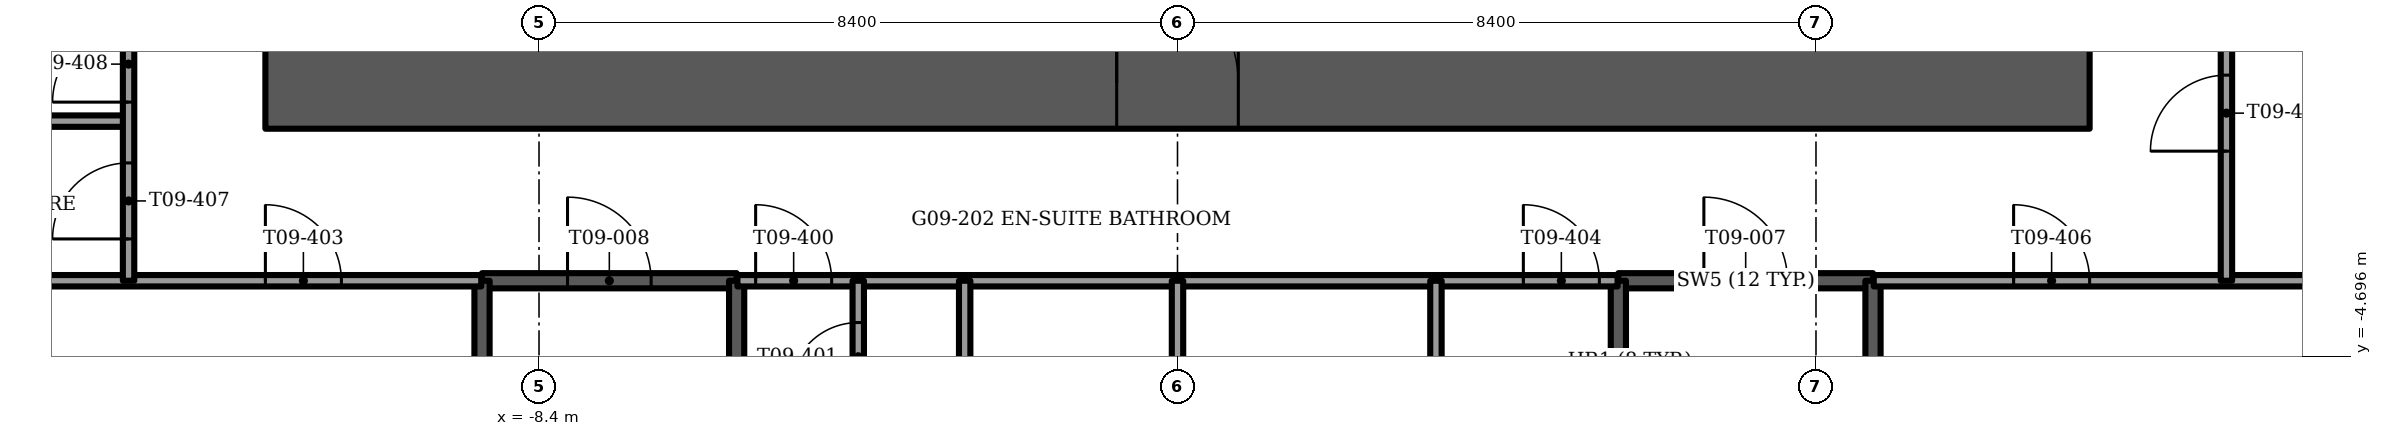
"""IFC4 building model, lengths in metres.
Left out: names, types, materials, properties, quantities, classifications, styles, units other than length and angle.
Written with IfcOpenShell. Run it as: python <this file> out.ifc"""

import sys

from ifc_helpers import new_model, si_unit, direction, frame, frame_2d, origin, place, context, subcontext, project, spatial, rectangle, extrude, element, fill, save


model = new_model("IFC4")
c1 = context("Model", 3, precision=1e-05, world=origin(), true_north=direction((0.0, 1.0)))
c2 = subcontext(c1, "Body", "Model", "MODEL_VIEW")
j1 = project(units=[si_unit("LENGTHUNIT", "METRE"), si_unit("PLANEANGLEUNIT", "RADIAN")], contexts=[c1])
p1 = place(None, origin())
s1 = spatial("IfcSite", under=j1, at=p1, CompositionType="ELEMENT")
p2 = place(p1, origin())
s2 = spatial("IfcBuilding", under=s1, at=p2, CompositionType="ELEMENT")
p3 = place(p2, frame((0.0, 0.0, 39.25)))
s3 = spatial("IfcBuildingStorey", under=s2, at=p3, CompositionType="ELEMENT", Elevation=39.25)
p4 = place(p3, frame((-12.0, -1.1, -0.3), z_axis=(0.0, 0.0, 1.0), x_axis=(1.0, 0.0, 0.0)))
e1 = element("IfcWall", 1, at=p4, inside=s3, PredefinedType="SHEAR", context=c2, shape_type="SweptSolid", body=[
    extrude(rectangle(XDim=24.0, YDim=1.2, at=frame_2d((12.0, 0.0))), origin(), (0.0, 0.0, 1.0), 3.75),
])
p5 = place(p4, frame((11.2, 0.0, 0.0)))
e2 = element("IfcOpeningElement", 2, at=p5, cuts=e1, PredefinedType="OPENING", context=c2, shape_type="SweptSolid", body=[
    extrude(rectangle(XDim=1.6, YDim=2.1, at=frame_2d((0.8, 1.05))), frame((0.0, 0.6, 0.0), z_axis=(0.0, -1.0, 0.0), x_axis=(1.0, 0.0, 0.0)), (0.0, 0.0, 1.0), 1.2),
])
p6 = place(p3, frame((-20.826, -0.778, 0.0), z_axis=(0.0, 0.0, 1.0), x_axis=(0.499999841607, -0.866025495233, 0.0)))
e3 = element("IfcWall", 3, at=p6, inside=s3, PredefinedType="SOLIDWALL", context=c2, shape_type="SweptSolid", body=[
    extrude(rectangle(XDim=19.479, YDim=0.15, at=frame_2d((9.739, 0.0))), origin(), (0.0, 0.0, 1.0), 3.45),
])
p7 = place(p6, frame((1.639, 0.0, 0.15)))
e4 = element("IfcOpeningElement", 4, at=p7, cuts=e3, PredefinedType="OPENING", context=c2, shape_type="SweptSolid", body=[
    extrude(rectangle(XDim=0.9, YDim=2.85, at=frame_2d((0.45, 1.425))), frame((0.0, 0.075, 0.0), z_axis=(0.0, -1.0, 0.0), x_axis=(1.0, 0.0, 0.0)), (0.0, 0.0, 1.0), 0.15),
])
p8 = place(p6, frame((5.839, 0.0, 0.15)))
e5 = element("IfcOpeningElement", 5, at=p8, cuts=e3, PredefinedType="OPENING", context=c2, shape_type="SweptSolid", body=[
    extrude(rectangle(XDim=1.8, YDim=2.85, at=frame_2d((0.9, 1.425))), frame((0.0, 0.075, 0.0), z_axis=(0.0, -1.0, 0.0), x_axis=(1.0, 0.0, 0.0)), (0.0, 0.0, 1.0), 0.15),
])
p9 = place(p6, frame((7.939, 0.0, 0.0)))
e6 = element("IfcOpeningElement", 6, at=p9, cuts=e3, PredefinedType="OPENING", context=c2, shape_type="SweptSolid", body=[
    extrude(rectangle(XDim=1.5, YDim=2.4, at=frame_2d((0.75, 1.2))), frame((0.0, 0.075, 0.0), z_axis=(0.0, -1.0, 0.0), x_axis=(1.0, 0.0, 0.0)), (0.0, 0.0, 1.0), 0.15),
])
p10 = place(p6, frame((10.039, 0.0, 0.15)))
e7 = element("IfcOpeningElement", 7, at=p10, cuts=e3, PredefinedType="OPENING", context=c2, shape_type="SweptSolid", body=[
    extrude(rectangle(XDim=1.8, YDim=2.85, at=frame_2d((0.9, 1.425))), frame((0.0, 0.075, 0.0), z_axis=(0.0, -1.0, 0.0), x_axis=(1.0, 0.0, 0.0)), (0.0, 0.0, 1.0), 0.15),
])
p11 = place(p6, frame((12.139, 0.0, 0.0)))
e8 = element("IfcOpeningElement", 8, at=p11, cuts=e3, PredefinedType="OPENING", context=c2, shape_type="SweptSolid", body=[
    extrude(rectangle(XDim=1.5, YDim=2.4, at=frame_2d((0.75, 1.2))), frame((0.0, 0.075, 0.0), z_axis=(0.0, -1.0, 0.0), x_axis=(1.0, 0.0, 0.0)), (0.0, 0.0, 1.0), 0.15),
])
p12 = place(p6, frame((14.239, 0.0, 0.15)))
e9 = element("IfcOpeningElement", 9, at=p12, cuts=e3, PredefinedType="OPENING", context=c2, shape_type="SweptSolid", body=[
    extrude(rectangle(XDim=1.8, YDim=2.85, at=frame_2d((0.9, 1.425))), frame((0.0, 0.075, 0.0), z_axis=(0.0, -1.0, 0.0), x_axis=(1.0, 0.0, 0.0)), (0.0, 0.0, 1.0), 0.15),
])
p13 = place(p6, frame((16.339, 0.0, 0.0)))
e10 = element("IfcOpeningElement", 10, at=p13, cuts=e3, PredefinedType="OPENING", context=c2, shape_type="SweptSolid", body=[
    extrude(rectangle(XDim=1.5, YDim=2.4, at=frame_2d((0.75, 1.2))), frame((0.0, 0.075, 0.0), z_axis=(0.0, -1.0, 0.0), x_axis=(1.0, 0.0, 0.0)), (0.0, 0.0, 1.0), 0.15),
])
p14 = place(p3, frame((11.087, -17.647, 0.0), z_axis=(0.0, 0.0, 1.0), x_axis=(0.499999841607, 0.866025495233, 0.0)))
e11 = element("IfcWall", 11, at=p14, inside=s3, PredefinedType="SOLIDWALL", context=c2, shape_type="SweptSolid", body=[
    extrude(rectangle(XDim=19.479, YDim=0.15, at=frame_2d((9.739, 0.0))), origin(), (0.0, 0.0, 1.0), 3.45),
])
p15 = place(p14, frame((1.639, 0.0, 0.15)))
e12 = element("IfcOpeningElement", 12, at=p15, cuts=e11, PredefinedType="OPENING", context=c2, shape_type="SweptSolid", body=[
    extrude(rectangle(XDim=1.8, YDim=2.85, at=frame_2d((0.9, 1.425))), frame((0.0, 0.075, 0.0), z_axis=(0.0, -1.0, 0.0), x_axis=(1.0, 0.0, 0.0)), (0.0, 0.0, 1.0), 0.15),
])
p16 = place(p14, frame((3.739, 0.0, 0.0)))
e13 = element("IfcOpeningElement", 13, at=p16, cuts=e11, PredefinedType="OPENING", context=c2, shape_type="SweptSolid", body=[
    extrude(rectangle(XDim=1.5, YDim=2.4, at=frame_2d((0.75, 1.2))), frame((0.0, 0.075, 0.0), z_axis=(0.0, -1.0, 0.0), x_axis=(1.0, 0.0, 0.0)), (0.0, 0.0, 1.0), 0.15),
])
p17 = place(p14, frame((5.839, 0.0, 0.15)))
e14 = element("IfcOpeningElement", 14, at=p17, cuts=e11, PredefinedType="OPENING", context=c2, shape_type="SweptSolid", body=[
    extrude(rectangle(XDim=1.8, YDim=2.85, at=frame_2d((0.9, 1.425))), frame((0.0, 0.075, 0.0), z_axis=(0.0, -1.0, 0.0), x_axis=(1.0, 0.0, 0.0)), (0.0, 0.0, 1.0), 0.15),
])
p18 = place(p14, frame((7.939, 0.0, 0.0)))
e15 = element("IfcOpeningElement", 15, at=p18, cuts=e11, PredefinedType="OPENING", context=c2, shape_type="SweptSolid", body=[
    extrude(rectangle(XDim=1.5, YDim=2.4, at=frame_2d((0.75, 1.2))), frame((0.0, 0.075, 0.0), z_axis=(0.0, -1.0, 0.0), x_axis=(1.0, 0.0, 0.0)), (0.0, 0.0, 1.0), 0.15),
])
p19 = place(p14, frame((10.039, 0.0, 0.15)))
e16 = element("IfcOpeningElement", 16, at=p19, cuts=e11, PredefinedType="OPENING", context=c2, shape_type="SweptSolid", body=[
    extrude(rectangle(XDim=1.8, YDim=2.85, at=frame_2d((0.9, 1.425))), frame((0.0, 0.075, 0.0), z_axis=(0.0, -1.0, 0.0), x_axis=(1.0, 0.0, 0.0)), (0.0, 0.0, 1.0), 0.15),
])
p20 = place(p14, frame((12.139, 0.0, 0.0)))
e17 = element("IfcOpeningElement", 17, at=p20, cuts=e11, PredefinedType="OPENING", context=c2, shape_type="SweptSolid", body=[
    extrude(rectangle(XDim=1.5, YDim=2.4, at=frame_2d((0.75, 1.2))), frame((0.0, 0.075, 0.0), z_axis=(0.0, -1.0, 0.0), x_axis=(1.0, 0.0, 0.0)), (0.0, 0.0, 1.0), 0.15),
])
p21 = place(p14, frame((14.239, 0.0, 0.15)))
e18 = element("IfcOpeningElement", 18, at=p21, cuts=e11, PredefinedType="OPENING", context=c2, shape_type="SweptSolid", body=[
    extrude(rectangle(XDim=0.9, YDim=2.85, at=frame_2d((0.45, 1.425))), frame((0.0, 0.075, 0.0), z_axis=(0.0, -1.0, 0.0), x_axis=(1.0, 0.0, 0.0)), (0.0, 0.0, 1.0), 0.15),
])
p22 = place(p3, frame((5.8, -3.7, -0.3), z_axis=(0.0, 0.0, 1.0), x_axis=(1.0, 0.0, 0.0)))
e19 = element("IfcWall", 19, at=p22, inside=s3, PredefinedType="SOLIDWALL", context=c2, shape_type="SweptSolid", body=[
    extrude(rectangle(XDim=3.35, YDim=0.2, at=frame_2d((1.675, 0.0))), origin(), (0.0, 0.0, 1.0), 3.75),
])
p23 = place(p22, frame((1.125, 0.0, 0.0)))
e20 = element("IfcOpeningElement", 20, at=p23, cuts=e19, PredefinedType="OPENING", context=c2, shape_type="SweptSolid", body=[
    extrude(rectangle(XDim=1.1, YDim=2.1, at=frame_2d((0.55, 1.05))), frame((0.0, 0.1, 0.0), z_axis=(0.0, -1.0, 0.0), x_axis=(1.0, 0.0, 0.0)), (0.0, 0.0, 1.0), 0.2),
])
for number, where, z_axis, x_axis in (
    (21, (5.8, -3.7, -0.3), (0.0, 0.0, 1.0), (0.0, -1.0, 0.0)),
    (22, (9.15, -3.7, -0.3), (0.0, 0.0, 1.0), (0.0, -1.0, 0.0)),
):
    element("IfcWall", number, at=place(p3, frame(where, z_axis=z_axis, x_axis=x_axis)), inside=s3, PredefinedType="SOLIDWALL", context=c2, shape_type="SweptSolid", body=[
        extrude(rectangle(XDim=7.7, YDim=0.2, at=frame_2d((3.85, 0.0))), origin(), (0.0, 0.0, 1.0), 3.75),
    ])
p24 = place(p3, frame((-9.15, -3.7, -0.3), z_axis=(0.0, 0.0, 1.0), x_axis=(1.0, 0.0, 0.0)))
e23 = element("IfcWall", 23, at=p24, inside=s3, PredefinedType="SOLIDWALL", context=c2, shape_type="SweptSolid", body=[
    extrude(rectangle(XDim=3.35, YDim=0.2, at=frame_2d((1.675, 0.0))), origin(), (0.0, 0.0, 1.0), 3.75),
])
p25 = place(p24, frame((1.125, 0.0, 0.0)))
e24 = element("IfcOpeningElement", 24, at=p25, cuts=e23, PredefinedType="OPENING", context=c2, shape_type="SweptSolid", body=[
    extrude(rectangle(XDim=1.1, YDim=2.1, at=frame_2d((0.55, 1.05))), frame((0.0, 0.1, 0.0), z_axis=(0.0, -1.0, 0.0), x_axis=(1.0, 0.0, 0.0)), (0.0, 0.0, 1.0), 0.2),
])
for number, where, z_axis, x_axis in (
    (25, (-9.15, -3.7, -0.3), (0.0, 0.0, 1.0), (0.0, -1.0, 0.0)),
    (26, (-5.8, -3.7, -0.3), (0.0, 0.0, 1.0), (0.0, -1.0, 0.0)),
):
    element("IfcWall", number, at=place(p3, frame(where, z_axis=z_axis, x_axis=x_axis)), inside=s3, PredefinedType="SOLIDWALL", context=c2, shape_type="SweptSolid", body=[
        extrude(rectangle(XDim=7.7, YDim=0.2, at=frame_2d((3.85, 0.0))), origin(), (0.0, 0.0, 1.0), 3.75),
    ])
p26 = place(p3, frame((-19.191, -3.7, 0.0), z_axis=(0.0, 0.0, 1.0), x_axis=(1.0, 0.0, 0.0)))
e27 = element("IfcWall", 27, at=p26, inside=s3, PredefinedType="PARTITIONING", context=c2, shape_type="SweptSolid", body=[
    extrude(rectangle(XDim=10.031, YDim=0.15, at=frame_2d((5.016, 0.0))), origin(), (0.0, 0.0, 1.0), 3.45),
])
p27 = place(p26, frame((7.191, 0.0, 0.0)))
e28 = element("IfcOpeningElement", 28, at=p27, cuts=e27, PredefinedType="OPENING", context=c2, shape_type="SweptSolid", body=[
    extrude(rectangle(XDim=1.0, YDim=2.1, at=frame_2d((0.5, 1.05))), frame((0.0, 0.075, 0.0), z_axis=(0.0, -1.0, 0.0), x_axis=(1.0, 0.0, 0.0)), (0.0, 0.0, 1.0), 0.15),
])
p28 = place(p3, frame((-5.79, -3.7, 0.0), z_axis=(0.0, 0.0, 1.0), x_axis=(1.0, 0.0, 0.0)))
e29 = element("IfcWall", 29, at=p28, inside=s3, PredefinedType="PARTITIONING", context=c2, shape_type="SweptSolid", body=[
    extrude(rectangle(XDim=11.58, YDim=0.15, at=frame_2d((5.79, 0.0))), origin(), (0.0, 0.0, 1.0), 3.45),
])
p29 = place(p28, frame((0.24, 0.0, 0.0)))
e30 = element("IfcOpeningElement", 30, at=p29, cuts=e29, PredefinedType="OPENING", context=c2, shape_type="SweptSolid", body=[
    extrude(rectangle(XDim=1.0, YDim=2.1, at=frame_2d((0.5, 1.05))), frame((0.0, 0.075, 0.0), z_axis=(0.0, -1.0, 0.0), x_axis=(1.0, 0.0, 0.0)), (0.0, 0.0, 1.0), 0.15),
])
p30 = place(p28, frame((10.34, 0.0, 0.0)))
e31 = element("IfcOpeningElement", 31, at=p30, cuts=e29, PredefinedType="OPENING", context=c2, shape_type="SweptSolid", body=[
    extrude(rectangle(XDim=1.0, YDim=2.1, at=frame_2d((0.5, 1.05))), frame((0.0, 0.075, 0.0), z_axis=(0.0, -1.0, 0.0), x_axis=(1.0, 0.0, 0.0)), (0.0, 0.0, 1.0), 0.15),
])
p31 = place(p3, frame((9.16, -3.7, 0.0), z_axis=(0.0, 0.0, 1.0), x_axis=(1.0, 0.0, 0.0)))
e32 = element("IfcWall", 32, at=p31, inside=s3, PredefinedType="PARTITIONING", context=c2, shape_type="SweptSolid", body=[
    extrude(rectangle(XDim=10.031, YDim=0.15, at=frame_2d((5.016, 0.0))), origin(), (0.0, 0.0, 1.0), 3.45),
])
p32 = place(p31, frame((1.84, 0.0, 0.0)))
e33 = element("IfcOpeningElement", 33, at=p32, cuts=e32, PredefinedType="OPENING", context=c2, shape_type="SweptSolid", body=[
    extrude(rectangle(XDim=1.0, YDim=2.1, at=frame_2d((0.5, 1.05))), frame((0.0, 0.075, 0.0), z_axis=(0.0, -1.0, 0.0), x_axis=(1.0, 0.0, 0.0)), (0.0, 0.0, 1.0), 0.15),
])
p33 = place(p3, frame((-20.404, -1.6, 0.0), z_axis=(0.0, 0.0, 1.0), x_axis=(1.0, 0.0, 0.0)))
e34 = element("IfcWall", 34, at=p33, inside=s3, PredefinedType="PARTITIONING", context=c2, shape_type="SweptSolid", body=[
    extrude(rectangle(XDim=6.604, YDim=0.15, at=frame_2d((3.302, 0.0))), origin(), (0.0, 0.0, 1.0), 3.45),
])
p34 = place(p3, frame((13.8, -3.7, 0.0), z_axis=(0.0, 0.0, 1.0), x_axis=(0.0, 1.0, 0.0)))
e35 = element("IfcWall", 35, at=p34, inside=s3, PredefinedType="PARTITIONING", context=c2, shape_type="SweptSolid", body=[
    extrude(rectangle(XDim=16.247, YDim=0.15, at=frame_2d((8.124, 0.0))), origin(), (0.0, 0.0, 1.0), 3.45),
])
p35 = place(p34, frame((1.705, 0.0, 0.0)))
e36 = element("IfcOpeningElement", 36, at=p35, cuts=e35, PredefinedType="OPENING", context=c2, shape_type="SweptSolid", body=[
    extrude(rectangle(XDim=1.0, YDim=2.1, at=frame_2d((0.5, 1.05))), frame((0.0, 0.075, 0.0), z_axis=(0.0, -1.0, 0.0), x_axis=(1.0, 0.0, 0.0)), (0.0, 0.0, 1.0), 0.15),
])
p36 = place(p34, frame((7.9, 0.0, 0.0)))
e37 = element("IfcOpeningElement", 37, at=p36, cuts=e35, PredefinedType="OPENING", context=c2, shape_type="SweptSolid", body=[
    extrude(rectangle(XDim=1.0, YDim=2.1, at=frame_2d((0.5, 1.05))), frame((0.0, 0.075, 0.0), z_axis=(0.0, -1.0, 0.0), x_axis=(1.0, 0.0, 0.0)), (0.0, 0.0, 1.0), 0.15),
])
p37 = place(p34, frame((12.753, 0.0, 0.0)))
e38 = element("IfcOpeningElement", 38, at=p37, cuts=e35, PredefinedType="OPENING", context=c2, shape_type="SweptSolid", body=[
    extrude(rectangle(XDim=1.0, YDim=2.1, at=frame_2d((0.5, 1.05))), frame((0.0, 0.075, 0.0), z_axis=(0.0, -1.0, 0.0), x_axis=(1.0, 0.0, 0.0)), (0.0, 0.0, 1.0), 0.15),
])
p38 = place(p3, frame((3.4, -7.3, 0.0), z_axis=(0.0, 0.0, 1.0), x_axis=(0.0, 1.0, 0.0)))
e39 = element("IfcWall", 39, at=p38, inside=s3, PredefinedType="PARTITIONING", context=c2, shape_type="SweptSolid", body=[
    extrude(rectangle(XDim=3.6, YDim=0.15, at=frame_2d((1.8, 0.0))), origin(), (0.0, 0.0, 1.0), 3.45),
])
p39 = place(p38, frame((1.4, 0.0, 0.0)))
e40 = element("IfcOpeningElement", 40, at=p39, cuts=e39, PredefinedType="OPENING", context=c2, shape_type="SweptSolid", body=[
    extrude(rectangle(XDim=0.8, YDim=2.1, at=frame_2d((0.4, 1.05))), frame((0.0, 0.075, 0.0), z_axis=(0.0, -1.0, 0.0), x_axis=(1.0, 0.0, 0.0)), (0.0, 0.0, 1.0), 0.15),
])
p40 = place(p3, frame((0.0, -18.225, 0.0), z_axis=(0.0, 0.0, 1.0), x_axis=(0.0, 1.0, 0.0)))
e41 = element("IfcWall", 41, at=p40, inside=s3, PredefinedType="PARTITIONING", context=c2, shape_type="SweptSolid", body=[
    extrude(rectangle(XDim=14.525, YDim=0.15, at=frame_2d((7.263, 0.0))), origin(), (0.0, 0.0, 1.0), 3.45),
])
p41 = place(p3, frame((-2.8, -7.3, 0.0), z_axis=(0.0, 0.0, 1.0), x_axis=(0.0, 1.0, 0.0)))
e42 = element("IfcWall", 42, at=p41, inside=s3, PredefinedType="PARTITIONING", context=c2, shape_type="SweptSolid", body=[
    extrude(rectangle(XDim=3.6, YDim=0.15, at=frame_2d((1.8, 0.0))), origin(), (0.0, 0.0, 1.0), 3.45),
])
p42 = place(p41, frame((1.4, 0.0, 0.0)))
e43 = element("IfcOpeningElement", 43, at=p42, cuts=e42, PredefinedType="OPENING", context=c2, shape_type="SweptSolid", body=[
    extrude(rectangle(XDim=0.8, YDim=2.1, at=frame_2d((0.4, 1.05))), frame((0.0, 0.075, 0.0), z_axis=(0.0, -1.0, 0.0), x_axis=(1.0, 0.0, 0.0)), (0.0, 0.0, 1.0), 0.15),
])
p43 = place(p3, frame((-4.2, -18.225, 0.0), z_axis=(0.0, 0.0, 1.0), x_axis=(0.0, 1.0, 0.0)))
e44 = element("IfcWall", 44, at=p43, inside=s3, PredefinedType="PARTITIONING", context=c2, shape_type="SweptSolid", body=[
    extrude(rectangle(XDim=14.525, YDim=0.15, at=frame_2d((7.263, 0.0))), origin(), (0.0, 0.0, 1.0), 3.45),
])
p44 = place(p43, frame((13.075, 0.0, 0.0)))
e45 = element("IfcOpeningElement", 45, at=p44, cuts=e44, PredefinedType="OPENING", context=c2, shape_type="SweptSolid", body=[
    extrude(rectangle(XDim=0.9, YDim=2.1, at=frame_2d((0.45, 1.05))), frame((0.0, 0.075, 0.0), z_axis=(0.0, -1.0, 0.0), x_axis=(1.0, 0.0, 0.0)), (0.0, 0.0, 1.0), 0.15),
])
p45 = place(p3, frame((-13.8, -3.7, 0.0), z_axis=(0.0, 0.0, 1.0), x_axis=(0.0, 1.0, 0.0)))
e46 = element("IfcWall", 46, at=p45, inside=s3, PredefinedType="PARTITIONING", context=c2, shape_type="SweptSolid", body=[
    extrude(rectangle(XDim=16.247, YDim=0.15, at=frame_2d((8.124, 0.0))), origin(), (0.0, 0.0, 1.0), 3.45),
])
p46 = place(p45, frame((0.55, 0.0, 0.0)))
e47 = element("IfcOpeningElement", 47, at=p46, cuts=e46, PredefinedType="OPENING", context=c2, shape_type="SweptSolid", body=[
    extrude(rectangle(XDim=1.0, YDim=2.1, at=frame_2d((0.5, 1.05))), frame((0.0, 0.075, 0.0), z_axis=(0.0, -1.0, 0.0), x_axis=(1.0, 0.0, 0.0)), (0.0, 0.0, 1.0), 0.15),
])
p47 = place(p45, frame((2.35, 0.0, 0.0)))
e48 = element("IfcOpeningElement", 48, at=p47, cuts=e46, PredefinedType="OPENING", context=c2, shape_type="SweptSolid", body=[
    extrude(rectangle(XDim=1.0, YDim=2.1, at=frame_2d((0.5, 1.05))), frame((0.0, 0.075, 0.0), z_axis=(0.0, -1.0, 0.0), x_axis=(1.0, 0.0, 0.0)), (0.0, 0.0, 1.0), 0.15),
])
p48 = place(p45, frame((6.85, 0.0, 0.0)))
e49 = element("IfcOpeningElement", 49, at=p48, cuts=e46, PredefinedType="OPENING", context=c2, shape_type="SweptSolid", body=[
    extrude(rectangle(XDim=1.0, YDim=2.1, at=frame_2d((0.5, 1.05))), frame((0.0, 0.075, 0.0), z_axis=(0.0, -1.0, 0.0), x_axis=(1.0, 0.0, 0.0)), (0.0, 0.0, 1.0), 0.15),
])
p49 = place(p45, frame((11.703, 0.0, 0.0)))
e50 = element("IfcOpeningElement", 50, at=p49, cuts=e46, PredefinedType="OPENING", context=c2, shape_type="SweptSolid", body=[
    extrude(rectangle(XDim=1.0, YDim=2.1, at=frame_2d((0.5, 1.05))), frame((0.0, 0.075, 0.0), z_axis=(0.0, -1.0, 0.0), x_axis=(1.0, 0.0, 0.0)), (0.0, 0.0, 1.0), 0.15),
])
p50 = place(p5, origin())
e51 = element("IfcDoor", 51, at=p50, inside=s3, OperationType="DOUBLE_DOOR_SINGLE_SWING", PredefinedType="DOOR", context=c2, shape_type="SweptSolid", body=[
    extrude(rectangle(XDim=1.6, YDim=2.1, at=frame_2d((0.8, 1.05))), frame((0.0, 0.025, 0.0), z_axis=(0.0, -1.0, 0.0), x_axis=(1.0, 0.0, 0.0)), (0.0, 0.0, 1.0), 0.05),
])
fill(e2, e51)
p51 = place(p23, origin())
e52 = element("IfcDoor", 52, at=p51, inside=s3, OperationType="SINGLE_SWING_LEFT", PredefinedType="DOOR", context=c2, shape_type="SweptSolid", body=[
    extrude(rectangle(XDim=1.1, YDim=2.1, at=frame_2d((0.55, 1.05))), frame((0.0, 0.025, 0.0), z_axis=(0.0, -1.0, 0.0), x_axis=(1.0, 0.0, 0.0)), (0.0, 0.0, 1.0), 0.05),
])
fill(e20, e52)
p52 = place(p25, origin())
e53 = element("IfcDoor", 53, at=p52, inside=s3, OperationType="SINGLE_SWING_LEFT", PredefinedType="DOOR", context=c2, shape_type="SweptSolid", body=[
    extrude(rectangle(XDim=1.1, YDim=2.1, at=frame_2d((0.55, 1.05))), frame((0.0, 0.025, 0.0), z_axis=(0.0, -1.0, 0.0), x_axis=(1.0, 0.0, 0.0)), (0.0, 0.0, 1.0), 0.05),
])
fill(e24, e53)
p53 = place(p29, origin())
e54 = element("IfcDoor", 54, at=p53, inside=s3, OperationType="SINGLE_SWING_LEFT", PredefinedType="DOOR", context=c2, shape_type="SweptSolid", body=[
    extrude(rectangle(XDim=1.0, YDim=2.1, at=frame_2d((0.5, 1.05))), frame((0.0, 0.025, 0.0), z_axis=(0.0, -1.0, 0.0), x_axis=(1.0, 0.0, 0.0)), (0.0, 0.0, 1.0), 0.05),
])
fill(e30, e54)
p54 = place(p44, origin())
e55 = element("IfcDoor", 55, at=p54, inside=s3, OperationType="SINGLE_SWING_RIGHT", PredefinedType="DOOR", context=c2, shape_type="SweptSolid", body=[
    extrude(rectangle(XDim=0.9, YDim=2.1, at=frame_2d((0.45, 1.05))), frame((0.0, 0.025, 0.0), z_axis=(0.0, -1.0, 0.0), x_axis=(1.0, 0.0, 0.0)), (0.0, 0.0, 1.0), 0.05),
])
fill(e45, e55)
p55 = place(p27, origin())
e56 = element("IfcDoor", 56, at=p55, inside=s3, OperationType="SINGLE_SWING_RIGHT", PredefinedType="DOOR", context=c2, shape_type="SweptSolid", body=[
    extrude(rectangle(XDim=1.0, YDim=2.1, at=frame_2d((0.5, 1.05))), frame((0.0, 0.025, 0.0), z_axis=(0.0, -1.0, 0.0), x_axis=(1.0, 0.0, 0.0)), (0.0, 0.0, 1.0), 0.05),
])
fill(e28, e56)
p56 = place(p30, origin())
e57 = element("IfcDoor", 57, at=p56, inside=s3, OperationType="SINGLE_SWING_RIGHT", PredefinedType="DOOR", context=c2, shape_type="SweptSolid", body=[
    extrude(rectangle(XDim=1.0, YDim=2.1, at=frame_2d((0.5, 1.05))), frame((0.0, 0.025, 0.0), z_axis=(0.0, -1.0, 0.0), x_axis=(1.0, 0.0, 0.0)), (0.0, 0.0, 1.0), 0.05),
])
fill(e31, e57)
p57 = place(p32, origin())
e58 = element("IfcDoor", 58, at=p57, inside=s3, OperationType="SINGLE_SWING_LEFT", PredefinedType="DOOR", context=c2, shape_type="SweptSolid", body=[
    extrude(rectangle(XDim=1.0, YDim=2.1, at=frame_2d((0.5, 1.05))), frame((0.0, 0.025, 0.0), z_axis=(0.0, -1.0, 0.0), x_axis=(1.0, 0.0, 0.0)), (0.0, 0.0, 1.0), 0.05),
])
fill(e33, e58)
p58 = place(p46, origin())
e59 = element("IfcDoor", 59, at=p58, inside=s3, OperationType="SINGLE_SWING_LEFT", PredefinedType="DOOR", context=c2, shape_type="SweptSolid", body=[
    extrude(rectangle(XDim=1.0, YDim=2.1, at=frame_2d((0.5, 1.05))), frame((0.0, 0.025, 0.0), z_axis=(0.0, -1.0, 0.0), x_axis=(1.0, 0.0, 0.0)), (0.0, 0.0, 1.0), 0.05),
])
fill(e47, e59)
p59 = place(p47, origin())
e60 = element("IfcDoor", 60, at=p59, inside=s3, OperationType="SINGLE_SWING_LEFT", PredefinedType="DOOR", context=c2, shape_type="SweptSolid", body=[
    extrude(rectangle(XDim=1.0, YDim=2.1, at=frame_2d((0.5, 1.05))), frame((0.0, 0.025, 0.0), z_axis=(0.0, -1.0, 0.0), x_axis=(1.0, 0.0, 0.0)), (0.0, 0.0, 1.0), 0.05),
])
fill(e48, e60)
p60 = place(p35, origin())
e61 = element("IfcDoor", 61, at=p60, inside=s3, OperationType="SINGLE_SWING_LEFT", PredefinedType="DOOR", context=c2, shape_type="SweptSolid", body=[
    extrude(rectangle(XDim=1.0, YDim=2.1, at=frame_2d((0.5, 1.05))), frame((0.0, 0.025, 0.0), z_axis=(0.0, -1.0, 0.0), x_axis=(1.0, 0.0, 0.0)), (0.0, 0.0, 1.0), 0.05),
])
fill(e36, e61)
save(model, sys.argv[1])
